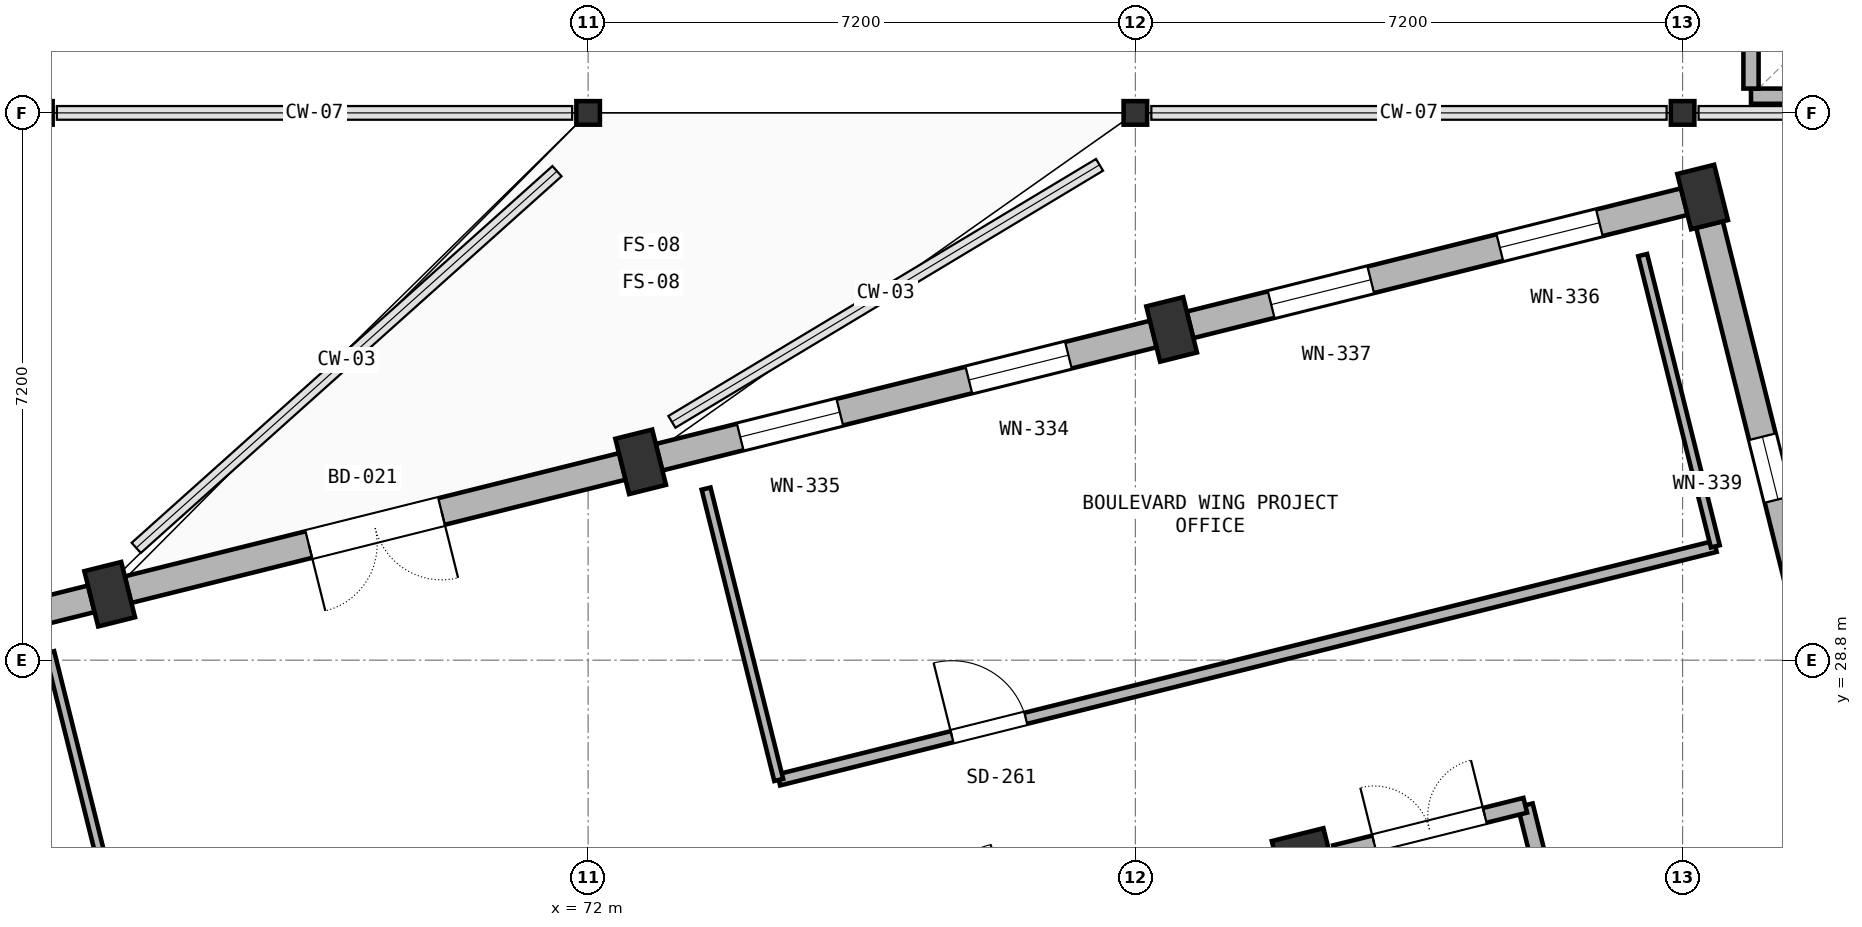
"""IFC4 building model, lengths in metres.
Left out: names, types, materials, properties, quantities, classifications, styles, units other than length and angle.
Written with IfcOpenShell. Run it as: python <this file> out.ifc"""

import sys

from ifc_helpers import new_model, si_unit, direction, frame, frame_2d, origin, origin_2d, place, context, subcontext, project, spatial, rectangle, hollow_rectangle, extrude, element, fill, save


model = new_model("IFC4")
c1 = context("Model", 3, precision=1e-05, world=origin(), true_north=direction((0.0, 1.0)))
c2 = subcontext(c1, "Body", "Model", "MODEL_VIEW")
j1 = project(units=[si_unit("LENGTHUNIT", "METRE"), si_unit("PLANEANGLEUNIT", "RADIAN")], contexts=[c1])
p1 = place(None, origin())
s1 = spatial("IfcSite", under=j1, at=p1, CompositionType="ELEMENT")
p2 = place(p1, origin())
s2 = spatial("IfcBuilding", under=s1, at=p2, CompositionType="ELEMENT")
p3 = place(p2, frame((0.0, 0.0, 14.4)))
s3 = spatial("IfcBuildingStorey", under=s2, at=p3, CompositionType="ELEMENT", Elevation=14.4)
for number, where, z_axis, x_axis in (
    (1, (65.705, 29.667, 0.0), (0.0, 0.0, 1.0), (0.97, 0.242, 0.0)),
    (2, (72.691, 31.409, 0.0), (0.0, 0.0, 1.0), (0.97, 0.242, 0.0)),
):
    element("IfcColumn", number, at=place(p3, frame(where, z_axis=z_axis, x_axis=x_axis)), inside=s3, PredefinedType="COLUMN", context=c2, shape_type="SweptSolid", body=[
        extrude(rectangle(XDim=0.5, YDim=0.75, at=origin_2d()), origin(), (0.0, 0.0, 1.0), 4.2),
    ])
p4 = place(p3, frame((81.419, 26.165, 0.0), z_axis=(0.0, 0.0, 1.0), x_axis=(0.970295726276, 0.2419218956, 0.0)))
e3 = element("IfcColumn", 3, at=p4, inside=s3, PredefinedType="COLUMN", context=c2, shape_type="SweptSolid", body=[
    extrude(rectangle(XDim=0.7, YDim=0.7, at=origin_2d()), origin(), (0.0, 0.0, 1.0), 4.2),
])
for number, where, z_axis, x_axis in (
    (4, (79.677, 33.151, 0.0), (0.0, 0.0, 1.0), (0.97, 0.242, 0.0)),
    (5, (86.664, 34.893, 0.0), (0.0, 0.0, 1.0), (0.97, 0.242, 0.0)),
):
    element("IfcColumn", number, at=place(p3, frame(where, z_axis=z_axis, x_axis=x_axis)), inside=s3, PredefinedType="COLUMN", context=c2, shape_type="SweptSolid", body=[
        extrude(rectangle(XDim=0.5, YDim=0.75, at=origin_2d()), origin(), (0.0, 0.0, 1.0), 4.2),
    ])
for number, where, z_axis, x_axis in (
    (6, (64.8, 36.0, 0.0), (0.0, 0.0, 1.0), (1.0, 0.0, 0.0)),
    (7, (72.0, 36.0, 0.0), (0.0, 0.0, 1.0), (1.0, 0.0, 0.0)),
    (8, (79.2, 36.0, 0.0), (0.0, 0.0, 1.0), (1.0, 0.0, 0.0)),
    (9, (86.4, 36.0, 0.0), (0.0, 0.0, 1.0), (1.0, 0.0, 0.0)),
):
    element("IfcColumn", number, at=place(p3, frame(where, z_axis=z_axis, x_axis=x_axis)), inside=s3, PredefinedType="COLUMN", context=c2, shape_type="SweptSolid", body=[
        extrude(hollow_rectangle(XDim=0.31, YDim=0.31, WallThickness=0.012, InnerFilletRadius=0.012, OuterFilletRadius=0.024, at=origin_2d()), origin(), (0.0, 0.0, 1.0), 4.2),
    ])
p5 = place(p3, frame((92.7, 36.22, 0.0), z_axis=(0.0, 0.0, 1.0), x_axis=(-1.0, 0.0, 0.0)))
e10 = element("IfcWall", 10, at=p5, inside=s3, PredefinedType="PARTITIONING", context=c2, shape_type="SweptSolid", body=[
    extrude(rectangle(XDim=5.4, YDim=0.2, at=frame_2d((2.7, 0.0))), origin(), (0.0, 0.0, 1.0), 3.48),
])
p6 = place(p3, frame((87.3, 42.88, 0.0), z_axis=(0.0, 0.0, 1.0), x_axis=(0.0, -1.0, 0.0)))
e11 = element("IfcWall", 11, at=p6, inside=s3, PredefinedType="PARTITIONING", context=c2, shape_type="SweptSolid", body=[
    extrude(rectangle(XDim=6.56, YDim=0.2, at=frame_2d((3.28, 0.0))), origin(), (0.0, 0.0, 1.0), 3.48),
])
p7 = place(p3, frame((65.465, 29.608, 0.0), z_axis=(0.0, 0.0, 1.0), x_axis=(-0.970296540998, -0.241918627903, 0.0)))
e12 = element("IfcWall", 12, at=p7, inside=s3, PredefinedType="SOLIDWALL", context=c2, shape_type="SweptSolid", body=[
    extrude(rectangle(XDim=6.704, YDim=0.36, at=frame_2d((3.352, 0.0))), origin(), (0.0, 0.0, 1.0), 3.04),
])
p8 = place(p7, frame((1.152, 0.0, 0.65)))
e13 = element("IfcOpeningElement", 13, at=p8, cuts=e12, PredefinedType="OPENING", context=c2, shape_type="SweptSolid", body=[
    extrude(rectangle(XDim=1.35, YDim=2.15, at=frame_2d((0.675, 1.075))), frame((0.0, 0.19, 0.0), z_axis=(0.0, -1.0, 0.0), x_axis=(1.0, 0.0, 0.0)), (0.0, 0.0, 1.0), 0.38),
])
p9 = place(p7, frame((4.252, 0.0, 0.65)))
e14 = element("IfcOpeningElement", 14, at=p9, cuts=e12, PredefinedType="OPENING", context=c2, shape_type="SweptSolid", body=[
    extrude(rectangle(XDim=1.35, YDim=2.15, at=frame_2d((0.675, 1.075))), frame((0.0, 0.19, 0.0), z_axis=(0.0, -1.0, 0.0), x_axis=(1.0, 0.0, 0.0)), (0.0, 0.0, 1.0), 0.38),
])
p10 = place(p3, frame((72.451, 31.349, 0.0), z_axis=(0.0, 0.0, 1.0), x_axis=(-0.970296540998, -0.241918627903, 0.0)))
e15 = element("IfcWall", 15, at=p10, inside=s3, PredefinedType="SOLIDWALL", context=c2, shape_type="SweptSolid", body=[
    extrude(rectangle(XDim=6.704, YDim=0.36, at=frame_2d((3.352, 0.0))), origin(), (0.0, 0.0, 1.0), 3.04),
])
p11 = place(p10, frame((2.452, 0.0, 0.0)))
e16 = element("IfcOpeningElement", 16, at=p11, cuts=e15, PredefinedType="OPENING", context=c2, shape_type="SweptSolid", body=[
    extrude(rectangle(XDim=1.8, YDim=2.2, at=frame_2d((0.9, 1.1))), frame((0.0, 0.19, 0.0), z_axis=(0.0, -1.0, 0.0), x_axis=(1.0, 0.0, 0.0)), (0.0, 0.0, 1.0), 0.38),
])
p12 = place(p3, frame((79.437, 33.091, 0.0), z_axis=(0.0, 0.0, 1.0), x_axis=(-0.970296540998, -0.241918627903, 0.0)))
e17 = element("IfcWall", 17, at=p12, inside=s3, PredefinedType="SOLIDWALL", context=c2, shape_type="SweptSolid", body=[
    extrude(rectangle(XDim=6.704, YDim=0.36, at=frame_2d((3.352, 0.0))), origin(), (0.0, 0.0, 1.0), 3.04),
])
p13 = place(p12, frame((1.152, 0.0, 0.65)))
e18 = element("IfcOpeningElement", 18, at=p13, cuts=e17, PredefinedType="OPENING", context=c2, shape_type="SweptSolid", body=[
    extrude(rectangle(XDim=1.35, YDim=2.15, at=frame_2d((0.675, 1.075))), frame((0.0, 0.19, 0.0), z_axis=(0.0, -1.0, 0.0), x_axis=(1.0, 0.0, 0.0)), (0.0, 0.0, 1.0), 0.38),
])
p14 = place(p12, frame((4.252, 0.0, 0.65)))
e19 = element("IfcOpeningElement", 19, at=p14, cuts=e17, PredefinedType="OPENING", context=c2, shape_type="SweptSolid", body=[
    extrude(rectangle(XDim=1.35, YDim=2.15, at=frame_2d((0.675, 1.075))), frame((0.0, 0.19, 0.0), z_axis=(0.0, -1.0, 0.0), x_axis=(1.0, 0.0, 0.0)), (0.0, 0.0, 1.0), 0.38),
])
p15 = place(p3, frame((86.423, 34.833, 0.0), z_axis=(0.0, 0.0, 1.0), x_axis=(-0.970296540998, -0.241918627903, 0.0)))
e20 = element("IfcWall", 20, at=p15, inside=s3, PredefinedType="SOLIDWALL", context=c2, shape_type="SweptSolid", body=[
    extrude(rectangle(XDim=6.704, YDim=0.36, at=frame_2d((3.352, 0.0))), origin(), (0.0, 0.0, 1.0), 3.04),
])
p16 = place(p15, frame((1.152, 0.0, 0.65)))
e21 = element("IfcOpeningElement", 21, at=p16, cuts=e20, PredefinedType="OPENING", context=c2, shape_type="SweptSolid", body=[
    extrude(rectangle(XDim=1.35, YDim=2.15, at=frame_2d((0.675, 1.075))), frame((0.0, 0.19, 0.0), z_axis=(0.0, -1.0, 0.0), x_axis=(1.0, 0.0, 0.0)), (0.0, 0.0, 1.0), 0.38),
])
p17 = place(p15, frame((4.252, 0.0, 0.65)))
e22 = element("IfcOpeningElement", 22, at=p17, cuts=e20, PredefinedType="OPENING", context=c2, shape_type="SweptSolid", body=[
    extrude(rectangle(XDim=1.35, YDim=2.15, at=frame_2d((0.675, 1.075))), frame((0.0, 0.19, 0.0), z_axis=(0.0, -1.0, 0.0), x_axis=(1.0, 0.0, 0.0)), (0.0, 0.0, 1.0), 0.38),
])
p18 = place(p3, frame((88.315, 28.269, 0.0), z_axis=(0.0, 0.0, 1.0), x_axis=(-0.241939253206, 0.970291398374, 0.0)))
e23 = element("IfcWall", 23, at=p18, inside=s3, PredefinedType="SOLIDWALL", context=c2, shape_type="SweptSolid", body=[
    extrude(rectangle(XDim=6.454, YDim=0.36, at=frame_2d((3.227, 0.0))), origin(), (0.0, 0.0, 1.0), 3.04),
])
p19 = place(p18, frame((2.727, 0.0, 0.7)))
e24 = element("IfcOpeningElement", 24, at=p19, cuts=e23, PredefinedType="OPENING", context=c2, shape_type="SweptSolid", body=[
    extrude(rectangle(XDim=0.85, YDim=2.19, at=frame_2d((0.425, 1.095))), frame((0.0, 0.19, 0.0), z_axis=(0.0, -1.0, 0.0), x_axis=(1.0, 0.0, 0.0)), (0.0, 0.0, 1.0), 0.38),
])
p20 = place(p3, frame((86.072, 19.905, 0.0), z_axis=(0.0, 0.0, 1.0), x_axis=(-0.241937193493, 0.970291911955, 0.0)))
e25 = element("IfcWall", 25, at=p20, inside=s3, PredefinedType="PARTITIONING", context=c2, shape_type="SweptSolid", body=[
    extrude(rectangle(XDim=7.2, YDim=0.2, at=frame_2d((3.6, 0.0))), origin(), (0.0, 0.0, 1.0), 3.08),
])
p21 = place(p3, frame((84.33, 26.891, 0.0), z_axis=(0.0, 0.0, 1.0), x_axis=(-0.970309259708, -0.2418676095, 0.0)))
e26 = element("IfcWall", 26, at=p21, inside=s3, PredefinedType="PARTITIONING", context=c2, shape_type="SweptSolid", body=[
    extrude(rectangle(XDim=2.58, YDim=0.2, at=frame_2d((1.29, 0.0))), origin(), (0.0, 0.0, 1.0), 3.08),
])
p22 = place(p21, frame((0.55, 0.0, 0.0)))
e27 = element("IfcOpeningElement", 27, at=p22, cuts=e26, PredefinedType="OPENING", context=c2, shape_type="SweptSolid", body=[
    extrude(rectangle(XDim=1.5, YDim=2.2, at=frame_2d((0.75, 1.1))), frame((0.0, 0.11, 0.0), z_axis=(0.0, -1.0, 0.0), x_axis=(1.0, 0.0, 0.0)), (0.0, 0.0, 1.0), 0.22),
])
p23 = place(p3, frame((64.917, 28.904, 0.0), z_axis=(0.0, 0.0, 1.0), x_axis=(0.241924747697, -0.970295015164, 0.0)))
e28 = element("IfcWall", 28, at=p23, inside=s3, PredefinedType="PARTITIONING", context=c2, shape_type="SweptSolid", body=[
    extrude(rectangle(XDim=3.95, YDim=0.12, at=frame_2d((1.975, 0.0))), origin(), (0.0, 0.0, 1.0), 3.08),
])
p24 = place(p3, frame((74.508, 27.225, 0.0), z_axis=(0.0, 0.0, 1.0), x_axis=(0.970298350757, 0.241911369139, 0.0)))
e29 = element("IfcWall", 29, at=p24, inside=s3, PredefinedType="PARTITIONING", context=c2, shape_type="SweptSolid", body=[
    extrude(rectangle(XDim=12.7, YDim=0.15, at=frame_2d((6.35, 0.0))), origin(), (0.0, 0.0, 1.0), 3.08),
])
p25 = place(p24, frame((2.35, 0.0, 0.0)))
e30 = element("IfcOpeningElement", 30, at=p25, cuts=e29, PredefinedType="OPENING", context=c2, shape_type="SweptSolid", body=[
    extrude(rectangle(XDim=1.0, YDim=2.15, at=frame_2d((0.5, 1.075))), frame((0.0, 0.085, 0.0), z_axis=(0.0, -1.0, 0.0), x_axis=(1.0, 0.0, 0.0)), (0.0, 0.0, 1.0), 0.17),
])
p26 = place(p3, frame((74.508, 27.225, 0.0), z_axis=(0.0, 0.0, 1.0), x_axis=(-0.241924747697, 0.970295015164, 0.0)))
e31 = element("IfcWall", 31, at=p26, inside=s3, PredefinedType="PARTITIONING", context=c2, shape_type="SweptSolid", body=[
    extrude(rectangle(XDim=3.95, YDim=0.12, at=frame_2d((1.975, 0.0))), origin(), (0.0, 0.0, 1.0), 3.08),
])
p27 = place(p3, frame((85.875, 34.13, 0.0), z_axis=(0.0, 0.0, 1.0), x_axis=(0.241910239337, -0.970298632434, 0.0)))
e32 = element("IfcWall", 32, at=p27, inside=s3, PredefinedType="PARTITIONING", context=c2, shape_type="SweptSolid", body=[
    extrude(rectangle(XDim=3.95, YDim=0.12, at=frame_2d((1.975, 0.0))), origin(), (0.0, 0.0, 1.0), 3.08),
])
p28 = place(p11, origin())
e33 = element("IfcDoor", 33, at=p28, inside=s3, OperationType="DOUBLE_DOOR_SINGLE_SWING", PredefinedType="DOOR", context=c2, shape_type="SweptSolid", body=[
    extrude(rectangle(XDim=1.8, YDim=2.2, at=frame_2d((0.9, 1.1))), frame((0.0, 0.025, 0.0), z_axis=(0.0, -1.0, 0.0), x_axis=(1.0, 0.0, 0.0)), (0.0, 0.0, 1.0), 0.05),
])
fill(e16, e33)
p29 = place(p13, origin())
e34 = element("IfcWindow", 34, at=p29, inside=s3, PartitioningType="DOUBLE_PANEL_VERTICAL", PredefinedType="WINDOW", context=c2, shape_type="SweptSolid", body=[
    extrude(rectangle(XDim=1.35, YDim=2.15, at=frame_2d((0.675, 1.075))), frame((0.0, 0.03, 0.0), z_axis=(0.0, -1.0, 0.0), x_axis=(1.0, 0.0, 0.0)), (0.0, 0.0, 1.0), 0.06),
])
fill(e18, e34)
p30 = place(p14, origin())
e35 = element("IfcWindow", 35, at=p30, inside=s3, PartitioningType="DOUBLE_PANEL_VERTICAL", PredefinedType="WINDOW", context=c2, shape_type="SweptSolid", body=[
    extrude(rectangle(XDim=1.35, YDim=2.15, at=frame_2d((0.675, 1.075))), frame((0.0, 0.03, 0.0), z_axis=(0.0, -1.0, 0.0), x_axis=(1.0, 0.0, 0.0)), (0.0, 0.0, 1.0), 0.06),
])
fill(e19, e35)
p31 = place(p16, origin())
e36 = element("IfcWindow", 36, at=p31, inside=s3, PartitioningType="DOUBLE_PANEL_VERTICAL", PredefinedType="WINDOW", context=c2, shape_type="SweptSolid", body=[
    extrude(rectangle(XDim=1.35, YDim=2.15, at=frame_2d((0.675, 1.075))), frame((0.0, 0.03, 0.0), z_axis=(0.0, -1.0, 0.0), x_axis=(1.0, 0.0, 0.0)), (0.0, 0.0, 1.0), 0.06),
])
fill(e21, e36)
p32 = place(p17, origin())
e37 = element("IfcWindow", 37, at=p32, inside=s3, PartitioningType="DOUBLE_PANEL_VERTICAL", PredefinedType="WINDOW", context=c2, shape_type="SweptSolid", body=[
    extrude(rectangle(XDim=1.35, YDim=2.15, at=frame_2d((0.675, 1.075))), frame((0.0, 0.03, 0.0), z_axis=(0.0, -1.0, 0.0), x_axis=(1.0, 0.0, 0.0)), (0.0, 0.0, 1.0), 0.06),
])
fill(e22, e37)
p33 = place(p19, origin())
e38 = element("IfcWindow", 38, at=p33, inside=s3, PartitioningType="SINGLE_PANEL", PredefinedType="WINDOW", context=c2, shape_type="SweptSolid", body=[
    extrude(rectangle(XDim=0.85, YDim=2.19, at=frame_2d((0.425, 1.095))), frame((0.0, 0.03, 0.0), z_axis=(0.0, -1.0, 0.0), x_axis=(1.0, 0.0, 0.0)), (0.0, 0.0, 1.0), 0.06),
])
fill(e24, e38)
p34 = place(p22, frame((1.5, 0.0, 0.0), z_axis=(0.0, 0.0, 1.0), x_axis=(-1.0, 0.0, 0.0)))
e39 = element("IfcDoor", 39, at=p34, inside=s3, OperationType="DOUBLE_DOOR_SINGLE_SWING", PredefinedType="DOOR", context=c2, shape_type="SweptSolid", body=[
    extrude(rectangle(XDim=1.5, YDim=2.2, at=frame_2d((0.75, 1.1))), frame((0.0, 0.025, 0.0), z_axis=(0.0, -1.0, 0.0), x_axis=(1.0, 0.0, 0.0)), (0.0, 0.0, 1.0), 0.05),
])
fill(e27, e39)
p35 = place(p25, origin())
e40 = element("IfcDoor", 40, at=p35, inside=s3, OperationType="SINGLE_SWING_LEFT", PredefinedType="DOOR", context=c2, shape_type="SweptSolid", body=[
    extrude(rectangle(XDim=1.0, YDim=2.15, at=frame_2d((0.5, 1.075))), frame((0.0, 0.025, 0.0), z_axis=(0.0, -1.0, 0.0), x_axis=(1.0, 0.0, 0.0)), (0.0, 0.0, 1.0), 0.05),
])
fill(e30, e40)
save(model, sys.argv[1])
